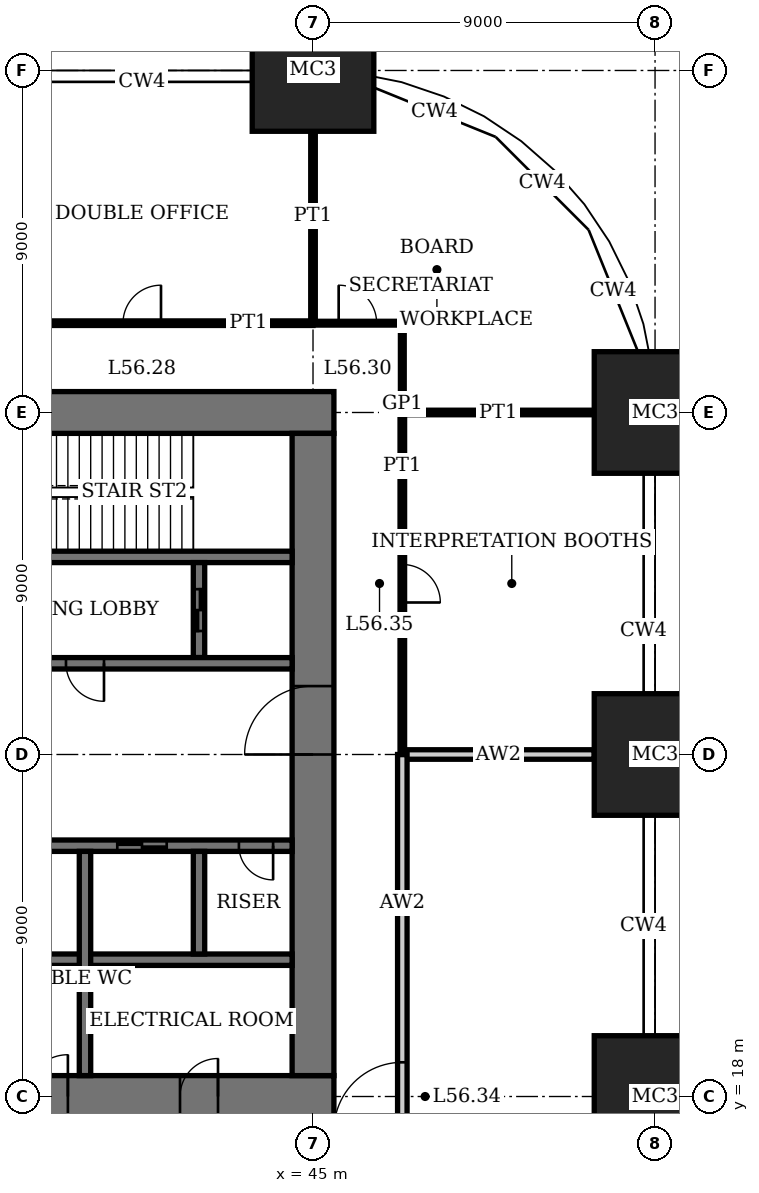
"""IFC4 building model, lengths in metres.
Left out: names, types, materials, properties, quantities, classifications, styles, units other than length and angle.
Written with IfcOpenShell. Run it as: python <this file> out.ifc"""

import sys

from ifc_helpers import new_model, si_unit, direction, frame, frame_2d, origin, origin_2d, place, context, subcontext, project, spatial, rectangle, extrude, element, fill, save


model = new_model("IFC4")
c1 = context("Model", 3, precision=1e-05, world=origin(), true_north=direction((0.0, 1.0)))
c2 = subcontext(c1, "Body", "Model", "MODEL_VIEW")
j1 = project(units=[si_unit("LENGTHUNIT", "METRE"), si_unit("PLANEANGLEUNIT", "RADIAN")], contexts=[c1])
p1 = place(None, origin())
s1 = spatial("IfcSite", under=j1, at=p1, CompositionType="ELEMENT")
p2 = place(p1, origin())
s2 = spatial("IfcBuilding", under=s1, at=p2, CompositionType="ELEMENT")
p3 = place(p2, frame((0.0, 0.0, 230.2)))
s3 = spatial("IfcBuildingStorey", under=s2, at=p3, CompositionType="ELEMENT", Elevation=230.2)
for number, where, z_axis, x_axis in (
    (1, (45.0, 45.0, 0.0), (0.0, 0.0, 1.0), (1.0, 0.0, 0.0)),
    (2, (54.0, 18.0, 0.0), (0.0, 0.0, 1.0), (1.0, 0.0, 0.0)),
    (3, (54.0, 27.0, 0.0), (0.0, 0.0, 1.0), (1.0, 0.0, 0.0)),
    (4, (54.0, 36.0, 0.0), (0.0, 0.0, 1.0), (1.0, 0.0, 0.0)),
):
    element("IfcColumn", number, at=place(p3, frame(where, z_axis=z_axis, x_axis=x_axis)), inside=s3, PredefinedType="COLUMN", context=c2, shape_type="SweptSolid", body=[
        extrude(rectangle(XDim=3.2, YDim=3.2, at=origin_2d()), origin(), (0.0, 0.0, 1.0), 4.2),
    ])
p4 = place(p3, frame((17.45, 18.0, 0.0), z_axis=(0.0, 0.0, 1.0), x_axis=(1.0, 0.0, 0.0)))
e5 = element("IfcWall", 5, at=p4, inside=s3, PredefinedType="SHEAR", context=c2, shape_type="SweptSolid", body=[
    extrude(rectangle(XDim=28.1, YDim=1.1, at=frame_2d((14.05, 0.0))), origin(), (0.0, 0.0, 1.0), 4.2),
])
p5 = place(p4, frame((11.55, 0.0, 0.0)))
e6 = element("IfcOpeningElement", 6, at=p5, cuts=e5, PredefinedType="OPENING", context=c2, shape_type="SweptSolid", body=[
    extrude(rectangle(XDim=1.0, YDim=2.4, at=frame_2d((0.5, 1.2))), frame((0.0, 0.56, 0.0), z_axis=(0.0, -1.0, 0.0), x_axis=(1.0, 0.0, 0.0)), (0.0, 0.0, 1.0), 1.12),
])
p6 = place(p4, frame((16.55, 0.0, 0.0)))
e7 = element("IfcOpeningElement", 7, at=p6, cuts=e5, PredefinedType="OPENING", context=c2, shape_type="SweptSolid", body=[
    extrude(rectangle(XDim=1.0, YDim=2.4, at=frame_2d((0.5, 1.2))), frame((0.0, 0.56, 0.0), z_axis=(0.0, -1.0, 0.0), x_axis=(1.0, 0.0, 0.0)), (0.0, 0.0, 1.0), 1.12),
])
p7 = place(p4, frame((20.0, 0.0, 0.0)))
e8 = element("IfcOpeningElement", 8, at=p7, cuts=e5, PredefinedType="OPENING", context=c2, shape_type="SweptSolid", body=[
    extrude(rectangle(XDim=1.1, YDim=2.4, at=frame_2d((0.55, 1.2))), frame((0.0, 0.56, 0.0), z_axis=(0.0, -1.0, 0.0), x_axis=(1.0, 0.0, 0.0)), (0.0, 0.0, 1.0), 1.12),
])
p8 = place(p4, frame((24.05, 0.0, 0.0)))
e9 = element("IfcOpeningElement", 9, at=p8, cuts=e5, PredefinedType="OPENING", context=c2, shape_type="SweptSolid", body=[
    extrude(rectangle(XDim=1.0, YDim=2.4, at=frame_2d((0.5, 1.2))), frame((0.0, 0.56, 0.0), z_axis=(0.0, -1.0, 0.0), x_axis=(1.0, 0.0, 0.0)), (0.0, 0.0, 1.0), 1.12),
])
p9 = place(p3, frame((45.55, 36.0, 0.0), z_axis=(0.0, 0.0, 1.0), x_axis=(-1.0, 0.0, 0.0)))
e10 = element("IfcWall", 10, at=p9, inside=s3, PredefinedType="SHEAR", context=c2, shape_type="SweptSolid", body=[
    extrude(rectangle(XDim=28.1, YDim=1.1, at=frame_2d((14.05, 0.0))), origin(), (0.0, 0.0, 1.0), 4.2),
])
p10 = place(p9, frame((11.55, 0.0, 0.0)))
e11 = element("IfcOpeningElement", 11, at=p10, cuts=e10, PredefinedType="OPENING", context=c2, shape_type="SweptSolid", body=[
    extrude(rectangle(XDim=1.0, YDim=2.4, at=frame_2d((0.5, 1.2))), frame((0.0, 0.56, 0.0), z_axis=(0.0, -1.0, 0.0), x_axis=(1.0, 0.0, 0.0)), (0.0, 0.0, 1.0), 1.12),
])
p11 = place(p9, frame((16.55, 0.0, 0.0)))
e12 = element("IfcOpeningElement", 12, at=p11, cuts=e10, PredefinedType="OPENING", context=c2, shape_type="SweptSolid", body=[
    extrude(rectangle(XDim=1.0, YDim=2.4, at=frame_2d((0.5, 1.2))), frame((0.0, 0.56, 0.0), z_axis=(0.0, -1.0, 0.0), x_axis=(1.0, 0.0, 0.0)), (0.0, 0.0, 1.0), 1.12),
])
p12 = place(p9, frame((20.0, 0.0, 0.0)))
e13 = element("IfcOpeningElement", 13, at=p12, cuts=e10, PredefinedType="OPENING", context=c2, shape_type="SweptSolid", body=[
    extrude(rectangle(XDim=1.1, YDim=2.4, at=frame_2d((0.55, 1.2))), frame((0.0, 0.56, 0.0), z_axis=(0.0, -1.0, 0.0), x_axis=(1.0, 0.0, 0.0)), (0.0, 0.0, 1.0), 1.12),
])
p13 = place(p9, frame((24.05, 0.0, 0.0)))
e14 = element("IfcOpeningElement", 14, at=p13, cuts=e10, PredefinedType="OPENING", context=c2, shape_type="SweptSolid", body=[
    extrude(rectangle(XDim=1.0, YDim=2.4, at=frame_2d((0.5, 1.2))), frame((0.0, 0.56, 0.0), z_axis=(0.0, -1.0, 0.0), x_axis=(1.0, 0.0, 0.0)), (0.0, 0.0, 1.0), 1.12),
])
p14 = place(p3, frame((45.0, 18.55, 0.0), z_axis=(0.0, 0.0, 1.0), x_axis=(0.0, 1.0, 0.0)))
e15 = element("IfcWall", 15, at=p14, inside=s3, PredefinedType="SHEAR", context=c2, shape_type="SweptSolid", body=[
    extrude(rectangle(XDim=16.9, YDim=1.1, at=frame_2d((8.45, 0.0))), origin(), (0.0, 0.0, 1.0), 4.2),
])
p15 = place(p14, frame((8.45, 0.0, 0.0)))
e16 = element("IfcOpeningElement", 16, at=p15, cuts=e15, PredefinedType="OPENING", context=c2, shape_type="SweptSolid", body=[
    extrude(rectangle(XDim=1.8, YDim=2.4, at=frame_2d((0.9, 1.2))), frame((0.0, 0.56, 0.0), z_axis=(0.0, -1.0, 0.0), x_axis=(1.0, 0.0, 0.0)), (0.0, 0.0, 1.0), 1.12),
])
p16 = place(p3, frame((36.15, 32.2, 0.0), z_axis=(0.0, 0.0, 1.0), x_axis=(1.0, 0.0, 0.0)))
e17 = element("IfcWall", 17, at=p16, inside=s3, PredefinedType="SHEAR", context=c2, shape_type="SweptSolid", body=[
    extrude(rectangle(XDim=8.3, YDim=0.3, at=frame_2d((4.15, 0.0))), origin(), (0.0, 0.0, 1.0), 4.2),
])
p17 = place(p16, frame((0.45, 0.0, 0.0)))
e18 = element("IfcOpeningElement", 18, at=p17, cuts=e17, PredefinedType="OPENING", context=c2, shape_type="SweptSolid", body=[
    extrude(rectangle(XDim=1.0, YDim=2.4, at=frame_2d((0.5, 1.2))), frame((0.0, 0.16, 0.0), z_axis=(0.0, -1.0, 0.0), x_axis=(1.0, 0.0, 0.0)), (0.0, 0.0, 1.0), 0.32),
])
p18 = place(p3, frame((42.0, 29.55, 0.0), z_axis=(0.0, 0.0, 1.0), x_axis=(0.0, 1.0, 0.0)))
e19 = element("IfcWall", 19, at=p18, inside=s3, PredefinedType="SHEAR", context=c2, shape_type="SweptSolid", body=[
    extrude(rectangle(XDim=2.5, YDim=0.3, at=frame_2d((1.25, 0.0))), origin(), (0.0, 0.0, 1.0), 4.2),
])
p19 = place(p18, frame((0.7, 0.0, 0.0)))
e20 = element("IfcOpeningElement", 20, at=p19, cuts=e19, PredefinedType="OPENING", context=c2, shape_type="SweptSolid", body=[
    extrude(rectangle(XDim=1.1, YDim=2.4, at=frame_2d((0.55, 1.2))), frame((0.0, 0.16, 0.0), z_axis=(0.0, -1.0, 0.0), x_axis=(1.0, 0.0, 0.0)), (0.0, 0.0, 1.0), 0.32),
])
p20 = place(p3, frame((18.55, 24.6, 0.0), z_axis=(0.0, 0.0, 1.0), x_axis=(1.0, 0.0, 0.0)))
e21 = element("IfcWall", 21, at=p20, inside=s3, PredefinedType="SHEAR", context=c2, shape_type="SweptSolid", body=[
    extrude(rectangle(XDim=25.9, YDim=0.3, at=frame_2d((12.95, 0.0))), origin(), (0.0, 0.0, 1.0), 4.2),
])
p21 = place(p20, frame((4.95, 0.0, 0.0)))
e22 = element("IfcOpeningElement", 22, at=p21, cuts=e21, PredefinedType="OPENING", context=c2, shape_type="SweptSolid", body=[
    extrude(rectangle(XDim=1.0, YDim=2.4, at=frame_2d((0.5, 1.2))), frame((0.0, 0.16, 0.0), z_axis=(0.0, -1.0, 0.0), x_axis=(1.0, 0.0, 0.0)), (0.0, 0.0, 1.0), 0.32),
])
p22 = place(p20, frame((24.5, 0.0, 0.0)))
e23 = element("IfcOpeningElement", 23, at=p22, cuts=e21, PredefinedType="OPENING", context=c2, shape_type="SweptSolid", body=[
    extrude(rectangle(XDim=0.9, YDim=2.1, at=frame_2d((0.45, 1.05))), frame((0.0, 0.16, 0.0), z_axis=(0.0, -1.0, 0.0), x_axis=(1.0, 0.0, 0.0)), (0.0, 0.0, 1.0), 0.32),
])
p23 = place(p20, frame((21.3, 0.0, 0.0)))
e24 = element("IfcOpeningElement", 24, at=p23, cuts=e21, PredefinedType="OPENING", context=c2, shape_type="SweptSolid", body=[
    extrude(rectangle(XDim=1.3, YDim=2.4, at=frame_2d((0.65, 1.2))), frame((0.0, 0.16, 0.0), z_axis=(0.0, -1.0, 0.0), x_axis=(1.0, 0.0, 0.0)), (0.0, 0.0, 1.0), 0.32),
])
p24 = place(p3, frame((18.55, 29.4, 0.0), z_axis=(0.0, 0.0, 1.0), x_axis=(1.0, 0.0, 0.0)))
e25 = element("IfcWall", 25, at=p24, inside=s3, PredefinedType="SHEAR", context=c2, shape_type="SweptSolid", body=[
    extrude(rectangle(XDim=25.9, YDim=0.3, at=frame_2d((12.95, 0.0))), origin(), (0.0, 0.0, 1.0), 4.2),
])
p25 = place(p24, frame((19.95, 0.0, 0.0)))
e26 = element("IfcOpeningElement", 26, at=p25, cuts=e25, PredefinedType="OPENING", context=c2, shape_type="SweptSolid", body=[
    extrude(rectangle(XDim=1.0, YDim=2.4, at=frame_2d((0.5, 1.2))), frame((0.0, 0.16, 0.0), z_axis=(0.0, -1.0, 0.0), x_axis=(1.0, 0.0, 0.0)), (0.0, 0.0, 1.0), 0.32),
])
p26 = place(p24, frame((0.5, 0.0, 0.0)))
e27 = element("IfcOpeningElement", 27, at=p26, cuts=e25, PredefinedType="OPENING", context=c2, shape_type="SweptSolid", body=[
    extrude(rectangle(XDim=0.9, YDim=2.1, at=frame_2d((0.45, 1.05))), frame((0.0, 0.16, 0.0), z_axis=(0.0, -1.0, 0.0), x_axis=(1.0, 0.0, 0.0)), (0.0, 0.0, 1.0), 0.32),
])
p27 = place(p24, frame((15.45, 0.0, 0.0)))
e28 = element("IfcOpeningElement", 28, at=p27, cuts=e25, PredefinedType="OPENING", context=c2, shape_type="SweptSolid", body=[
    extrude(rectangle(XDim=1.0, YDim=2.4, at=frame_2d((0.5, 1.2))), frame((0.0, 0.16, 0.0), z_axis=(0.0, -1.0, 0.0), x_axis=(1.0, 0.0, 0.0)), (0.0, 0.0, 1.0), 0.32),
])
p28 = place(p24, frame((12.45, 0.0, 0.0)))
e29 = element("IfcOpeningElement", 29, at=p28, cuts=e25, PredefinedType="OPENING", context=c2, shape_type="SweptSolid", body=[
    extrude(rectangle(XDim=1.0, YDim=2.4, at=frame_2d((0.5, 1.2))), frame((0.0, 0.16, 0.0), z_axis=(0.0, -1.0, 0.0), x_axis=(1.0, 0.0, 0.0)), (0.0, 0.0, 1.0), 0.32),
])
p29 = place(p24, frame((9.4, 0.0, 0.0)))
e30 = element("IfcOpeningElement", 30, at=p29, cuts=e25, PredefinedType="OPENING", context=c2, shape_type="SweptSolid", body=[
    extrude(rectangle(XDim=1.1, YDim=2.4, at=frame_2d((0.55, 1.2))), frame((0.0, 0.16, 0.0), z_axis=(0.0, -1.0, 0.0), x_axis=(1.0, 0.0, 0.0)), (0.0, 0.0, 1.0), 0.32),
])
p30 = place(p24, frame((6.4, 0.0, 0.0)))
e31 = element("IfcOpeningElement", 31, at=p30, cuts=e25, PredefinedType="OPENING", context=c2, shape_type="SweptSolid", body=[
    extrude(rectangle(XDim=1.1, YDim=2.4, at=frame_2d((0.55, 1.2))), frame((0.0, 0.16, 0.0), z_axis=(0.0, -1.0, 0.0), x_axis=(1.0, 0.0, 0.0)), (0.0, 0.0, 1.0), 0.32),
])
p31 = place(p24, frame((3.3, 0.0, 0.0)))
e32 = element("IfcOpeningElement", 32, at=p31, cuts=e25, PredefinedType="OPENING", context=c2, shape_type="SweptSolid", body=[
    extrude(rectangle(XDim=1.3, YDim=2.4, at=frame_2d((0.65, 1.2))), frame((0.0, 0.16, 0.0), z_axis=(0.0, -1.0, 0.0), x_axis=(1.0, 0.0, 0.0)), (0.0, 0.0, 1.0), 0.32),
])
p32 = place(p3, frame((27.15, 21.6, 0.0), z_axis=(0.0, 0.0, 1.0), x_axis=(1.0, 0.0, 0.0)))
e33 = element("IfcWall", 33, at=p32, inside=s3, PredefinedType="SHEAR", context=c2, shape_type="SweptSolid", body=[
    extrude(rectangle(XDim=17.3, YDim=0.3, at=frame_2d((8.65, 0.0))), origin(), (0.0, 0.0, 1.0), 4.2),
])
p33 = place(p3, frame((39.0, 18.55, 0.0), z_axis=(0.0, 0.0, 1.0), x_axis=(0.0, 1.0, 0.0)))
e34 = element("IfcWall", 34, at=p33, inside=s3, PredefinedType="SHEAR", context=c2, shape_type="SweptSolid", body=[
    extrude(rectangle(XDim=5.9, YDim=0.3, at=frame_2d((2.95, 0.0))), origin(), (0.0, 0.0, 1.0), 4.2),
])
p34 = place(p3, frame((42.0, 21.75, 0.0), z_axis=(0.0, 0.0, 1.0), x_axis=(0.0, 1.0, 0.0)))
e35 = element("IfcWall", 35, at=p34, inside=s3, PredefinedType="SHEAR", context=c2, shape_type="SweptSolid", body=[
    extrude(rectangle(XDim=2.7, YDim=0.3, at=frame_2d((1.35, 0.0))), origin(), (0.0, 0.0, 1.0), 4.2),
])
p35 = place(p3, frame((47.35, 27.0, 0.0), z_axis=(0.0, 0.0, 1.0), x_axis=(1.0, 0.0, 0.0)))
e36 = element("IfcWall", 36, at=p35, inside=s3, PredefinedType="PARTITIONING", context=c2, shape_type="SweptSolid", body=[
    extrude(rectangle(XDim=5.05, YDim=0.25, at=frame_2d((2.525, 0.0))), origin(), (0.0, 0.0, 1.0), 3.25),
])
p36 = place(p3, frame((47.35, 36.0, 0.0), z_axis=(0.0, 0.0, 1.0), x_axis=(1.0, 0.0, 0.0)))
e37 = element("IfcWall", 37, at=p36, inside=s3, PredefinedType="PARTITIONING", context=c2, shape_type="SweptSolid", body=[
    extrude(rectangle(XDim=5.05, YDim=0.12, at=frame_2d((2.525, 0.0))), origin(), (0.0, 0.0, 1.0), 3.25),
])
p37 = place(p3, frame((36.0, 38.35, 0.0), z_axis=(0.0, 0.0, 1.0), x_axis=(1.0, 0.0, 0.0)))
e38 = element("IfcWall", 38, at=p37, inside=s3, PredefinedType="PARTITIONING", context=c2, shape_type="SweptSolid", body=[
    extrude(rectangle(XDim=9.0, YDim=0.12, at=frame_2d((4.5, 0.0))), origin(), (0.0, 0.0, 1.0), 3.85),
])
p38 = place(p37, frame((4.0, 0.0, 0.0)))
e39 = element("IfcOpeningElement", 39, at=p38, cuts=e38, PredefinedType="OPENING", context=c2, shape_type="SweptSolid", body=[
    extrude(rectangle(XDim=1.0, YDim=2.4, at=frame_2d((0.5, 1.2))), frame((0.0, 0.07, 0.0), z_axis=(0.0, -1.0, 0.0), x_axis=(1.0, 0.0, 0.0)), (0.0, 0.0, 1.0), 0.14),
])
p39 = place(p3, frame((45.0, 38.35, 0.0), z_axis=(0.0, 0.0, 1.0), x_axis=(1.0, 0.0, 0.0)))
e40 = element("IfcWall", 40, at=p39, inside=s3, PredefinedType="PARTITIONING", context=c2, shape_type="SweptSolid", body=[
    extrude(rectangle(XDim=2.35, YDim=0.1, at=frame_2d((1.175, 0.0))), origin(), (0.0, 0.0, 1.0), 3.85),
])
p40 = place(p39, frame((0.675, 0.0, 0.0)))
e41 = element("IfcOpeningElement", 41, at=p40, cuts=e40, PredefinedType="OPENING", context=c2, shape_type="SweptSolid", body=[
    extrude(rectangle(XDim=1.0, YDim=2.4, at=frame_2d((0.5, 1.2))), frame((0.0, 0.06, 0.0), z_axis=(0.0, -1.0, 0.0), x_axis=(1.0, 0.0, 0.0)), (0.0, 0.0, 1.0), 0.12),
])
p41 = place(p3, frame((45.0, 38.35, 0.0), z_axis=(0.0, 0.0, 1.0), x_axis=(0.0, 1.0, 0.0)))
e42 = element("IfcWall", 42, at=p41, inside=s3, PredefinedType="PARTITIONING", context=c2, shape_type="SweptSolid", body=[
    extrude(rectangle(XDim=5.05, YDim=0.12, at=frame_2d((2.525, 0.0))), origin(), (0.0, 0.0, 1.0), 3.25),
])
p42 = place(p3, frame((47.35, 9.0, 0.0), z_axis=(0.0, 0.0, 1.0), x_axis=(0.0, 1.0, 0.0)))
e43 = element("IfcWall", 43, at=p42, inside=s3, PredefinedType="PARTITIONING", context=c2, shape_type="SweptSolid", body=[
    extrude(rectangle(XDim=18.0, YDim=0.25, at=frame_2d((9.0, 0.0))), origin(), (0.0, 0.0, 1.0), 3.85),
])
p43 = place(p42, frame((8.1, 0.0, 0.0)))
e44 = element("IfcOpeningElement", 44, at=p43, cuts=e43, PredefinedType="OPENING", context=c2, shape_type="SweptSolid", body=[
    extrude(rectangle(XDim=1.8, YDim=2.4, at=frame_2d((0.9, 1.2))), frame((0.0, 0.135, 0.0), z_axis=(0.0, -1.0, 0.0), x_axis=(1.0, 0.0, 0.0)), (0.0, 0.0, 1.0), 0.27),
])
p44 = place(p3, frame((47.35, 27.0, 0.0), z_axis=(0.0, 0.0, 1.0), x_axis=(0.0, 1.0, 0.0)))
e45 = element("IfcWall", 45, at=p44, inside=s3, PredefinedType="PARTITIONING", context=c2, shape_type="SweptSolid", body=[
    extrude(rectangle(XDim=9.0, YDim=0.12, at=frame_2d((4.5, 0.0))), origin(), (0.0, 0.0, 1.0), 3.85),
])
p45 = place(p44, frame((4.0, 0.0, 0.0)))
e46 = element("IfcOpeningElement", 46, at=p45, cuts=e45, PredefinedType="OPENING", context=c2, shape_type="SweptSolid", body=[
    extrude(rectangle(XDim=1.0, YDim=2.4, at=frame_2d((0.5, 1.2))), frame((0.0, 0.07, 0.0), z_axis=(0.0, -1.0, 0.0), x_axis=(1.0, 0.0, 0.0)), (0.0, 0.0, 1.0), 0.14),
])
p46 = place(p3, frame((47.35, 36.0, 0.0), z_axis=(0.0, 0.0, 1.0), x_axis=(0.0, 1.0, 0.0)))
e47 = element("IfcWall", 47, at=p46, inside=s3, PredefinedType="PARTITIONING", context=c2, shape_type="SweptSolid", body=[
    extrude(rectangle(XDim=2.35, YDim=0.1, at=frame_2d((1.175, 0.0))), origin(), (0.0, 0.0, 1.0), 3.85),
])
p47 = place(p15, origin())
e48 = element("IfcDoor", 48, at=p47, inside=s3, OperationType="DOUBLE_DOOR_DOUBLE_SWING", PredefinedType="DOOR", context=c2, shape_type="SweptSolid", body=[
    extrude(rectangle(XDim=1.8, YDim=2.4, at=frame_2d((0.9, 1.2))), frame((0.0, 0.03, 0.0), z_axis=(0.0, -1.0, 0.0), x_axis=(1.0, 0.0, 0.0)), (0.0, 0.0, 1.0), 0.06),
    extrude(rectangle(XDim=0.04, YDim=2.4, at=frame_2d((0.02, 1.2))), frame((0.0, 0.55, 0.0), z_axis=(0.0, -1.0, 0.0), x_axis=(1.0, 0.0, 0.0)), (0.0, 0.0, 1.0), 1.1),
    extrude(rectangle(XDim=0.04, YDim=2.4, at=frame_2d((1.78, 1.2))), frame((0.0, 0.55, 0.0), z_axis=(0.0, -1.0, 0.0), x_axis=(1.0, 0.0, 0.0)), (0.0, 0.0, 1.0), 1.1),
    extrude(rectangle(XDim=1.8, YDim=0.04, at=frame_2d((0.9, 2.38))), frame((0.0, 0.55, 0.0), z_axis=(0.0, -1.0, 0.0), x_axis=(1.0, 0.0, 0.0)), (0.0, 0.0, 1.0), 1.1),
])
fill(e16, e48)
p48 = place(p7, origin())
e49 = element("IfcDoor", 49, at=p48, inside=s3, OperationType="SINGLE_SWING_LEFT", PredefinedType="DOOR", context=c2, shape_type="SweptSolid", body=[
    extrude(rectangle(XDim=1.1, YDim=2.4, at=frame_2d((0.55, 1.2))), frame((0.0, 0.025, 0.0), z_axis=(0.0, -1.0, 0.0), x_axis=(1.0, 0.0, 0.0)), (0.0, 0.0, 1.0), 0.05),
    extrude(rectangle(XDim=0.04, YDim=2.4, at=frame_2d((0.02, 1.2))), frame((0.0, 0.44, 0.0), z_axis=(0.0, -1.0, 0.0), x_axis=(1.0, 0.0, 0.0)), (0.0, 0.0, 1.0), 0.88),
    extrude(rectangle(XDim=0.04, YDim=2.4, at=frame_2d((1.08, 1.2))), frame((0.0, 0.44, 0.0), z_axis=(0.0, -1.0, 0.0), x_axis=(1.0, 0.0, 0.0)), (0.0, 0.0, 1.0), 0.88),
    extrude(rectangle(XDim=1.1, YDim=0.04, at=frame_2d((0.55, 2.38))), frame((0.0, 0.44, 0.0), z_axis=(0.0, -1.0, 0.0), x_axis=(1.0, 0.0, 0.0)), (0.0, 0.0, 1.0), 0.88),
])
fill(e8, e49)
p49 = place(p8, origin())
e50 = element("IfcDoor", 50, at=p49, inside=s3, OperationType="SINGLE_SWING_LEFT", PredefinedType="DOOR", context=c2, shape_type="SweptSolid", body=[
    extrude(rectangle(XDim=1.0, YDim=2.4, at=frame_2d((0.5, 1.2))), frame((0.0, 0.025, 0.0), z_axis=(0.0, -1.0, 0.0), x_axis=(1.0, 0.0, 0.0)), (0.0, 0.0, 1.0), 0.05),
    extrude(rectangle(XDim=0.04, YDim=2.4, at=frame_2d((0.02, 1.2))), frame((0.0, 0.4, 0.0), z_axis=(0.0, -1.0, 0.0), x_axis=(1.0, 0.0, 0.0)), (0.0, 0.0, 1.0), 0.8),
    extrude(rectangle(XDim=0.04, YDim=2.4, at=frame_2d((0.98, 1.2))), frame((0.0, 0.4, 0.0), z_axis=(0.0, -1.0, 0.0), x_axis=(1.0, 0.0, 0.0)), (0.0, 0.0, 1.0), 0.8),
    extrude(rectangle(XDim=1.0, YDim=0.04, at=frame_2d((0.5, 2.38))), frame((0.0, 0.4, 0.0), z_axis=(0.0, -1.0, 0.0), x_axis=(1.0, 0.0, 0.0)), (0.0, 0.0, 1.0), 0.8),
])
fill(e9, e50)
p50 = place(p25, origin())
e51 = element("IfcDoor", 51, at=p50, inside=s3, OperationType="SINGLE_SWING_RIGHT", PredefinedType="DOOR", context=c2, shape_type="SweptSolid", body=[
    extrude(rectangle(XDim=1.0, YDim=2.4, at=frame_2d((0.5, 1.2))), frame((0.0, 0.03, 0.0), z_axis=(0.0, -1.0, 0.0), x_axis=(1.0, 0.0, 0.0)), (0.0, 0.0, 1.0), 0.06),
])
fill(e26, e51)
p51 = place(p22, origin())
e52 = element("IfcDoor", 52, at=p51, inside=s3, OperationType="SINGLE_SWING_RIGHT", PredefinedType="DOOR", context=c2, shape_type="SweptSolid", body=[
    extrude(rectangle(XDim=0.9, YDim=2.1, at=frame_2d((0.45, 1.05))), frame((0.0, 0.03, 0.0), z_axis=(0.0, -1.0, 0.0), x_axis=(1.0, 0.0, 0.0)), (0.0, 0.0, 1.0), 0.06),
])
fill(e23, e52)
p52 = place(p38, origin())
e53 = element("IfcDoor", 53, at=p52, inside=s3, OperationType="SINGLE_SWING_LEFT", PredefinedType="DOOR", context=c2, shape_type="SweptSolid", body=[
    extrude(rectangle(XDim=1.0, YDim=2.4, at=frame_2d((0.5, 1.2))), frame((0.0, 0.025, 0.0), z_axis=(0.0, -1.0, 0.0), x_axis=(1.0, 0.0, 0.0)), (0.0, 0.0, 1.0), 0.05),
])
fill(e39, e53)
p53 = place(p40, origin())
e54 = element("IfcDoor", 54, at=p53, inside=s3, OperationType="SINGLE_SWING_RIGHT", PredefinedType="DOOR", context=c2, shape_type="SweptSolid", body=[
    extrude(rectangle(XDim=1.0, YDim=2.4, at=frame_2d((0.5, 1.2))), frame((0.0, 0.02, 0.0), z_axis=(0.0, -1.0, 0.0), x_axis=(1.0, 0.0, 0.0)), (0.0, 0.0, 1.0), 0.04),
])
fill(e41, e54)
p54 = place(p43, origin())
e55 = element("IfcDoor", 55, at=p54, inside=s3, OperationType="DOUBLE_DOOR_SINGLE_SWING", PredefinedType="DOOR", context=c2, shape_type="SweptSolid", body=[
    extrude(rectangle(XDim=1.8, YDim=2.4, at=frame_2d((0.9, 1.2))), frame((0.0, 0.025, 0.0), z_axis=(0.0, -1.0, 0.0), x_axis=(1.0, 0.0, 0.0)), (0.0, 0.0, 1.0), 0.05),
])
fill(e44, e55)
p55 = place(p45, origin())
e56 = element("IfcDoor", 56, at=p55, inside=s3, OperationType="SINGLE_SWING_LEFT", PredefinedType="DOOR", context=c2, shape_type="SweptSolid", body=[
    extrude(rectangle(XDim=1.0, YDim=2.4, at=frame_2d((0.5, 1.2))), frame((0.0, 0.025, 0.0), z_axis=(0.0, -1.0, 0.0), x_axis=(1.0, 0.0, 0.0)), (0.0, 0.0, 1.0), 0.05),
])
fill(e46, e56)
p56 = place(p23, origin())
e57 = element("IfcDoor", 57, at=p56, inside=s3, OperationType="DOUBLE_DOOR_SLIDING", PredefinedType="DOOR", context=c2, shape_type="SweptSolid", body=[
    extrude(rectangle(XDim=1.3, YDim=2.4, at=frame_2d((0.65, 1.2))), frame((0.0, 0.02, 0.0), z_axis=(0.0, -1.0, 0.0), x_axis=(1.0, 0.0, 0.0)), (0.0, 0.0, 1.0), 0.04),
])
fill(e24, e57)
p57 = place(p19, origin())
e58 = element("IfcDoor", 58, at=p57, inside=s3, OperationType="DOUBLE_DOOR_SLIDING", PredefinedType="DOOR", context=c2, shape_type="SweptSolid", body=[
    extrude(rectangle(XDim=1.1, YDim=2.4, at=frame_2d((0.55, 1.2))), frame((0.0, 0.03, 0.0), z_axis=(0.0, -1.0, 0.0), x_axis=(1.0, 0.0, 0.0)), (0.0, 0.0, 1.0), 0.06),
])
fill(e20, e58)
save(model, sys.argv[1])
